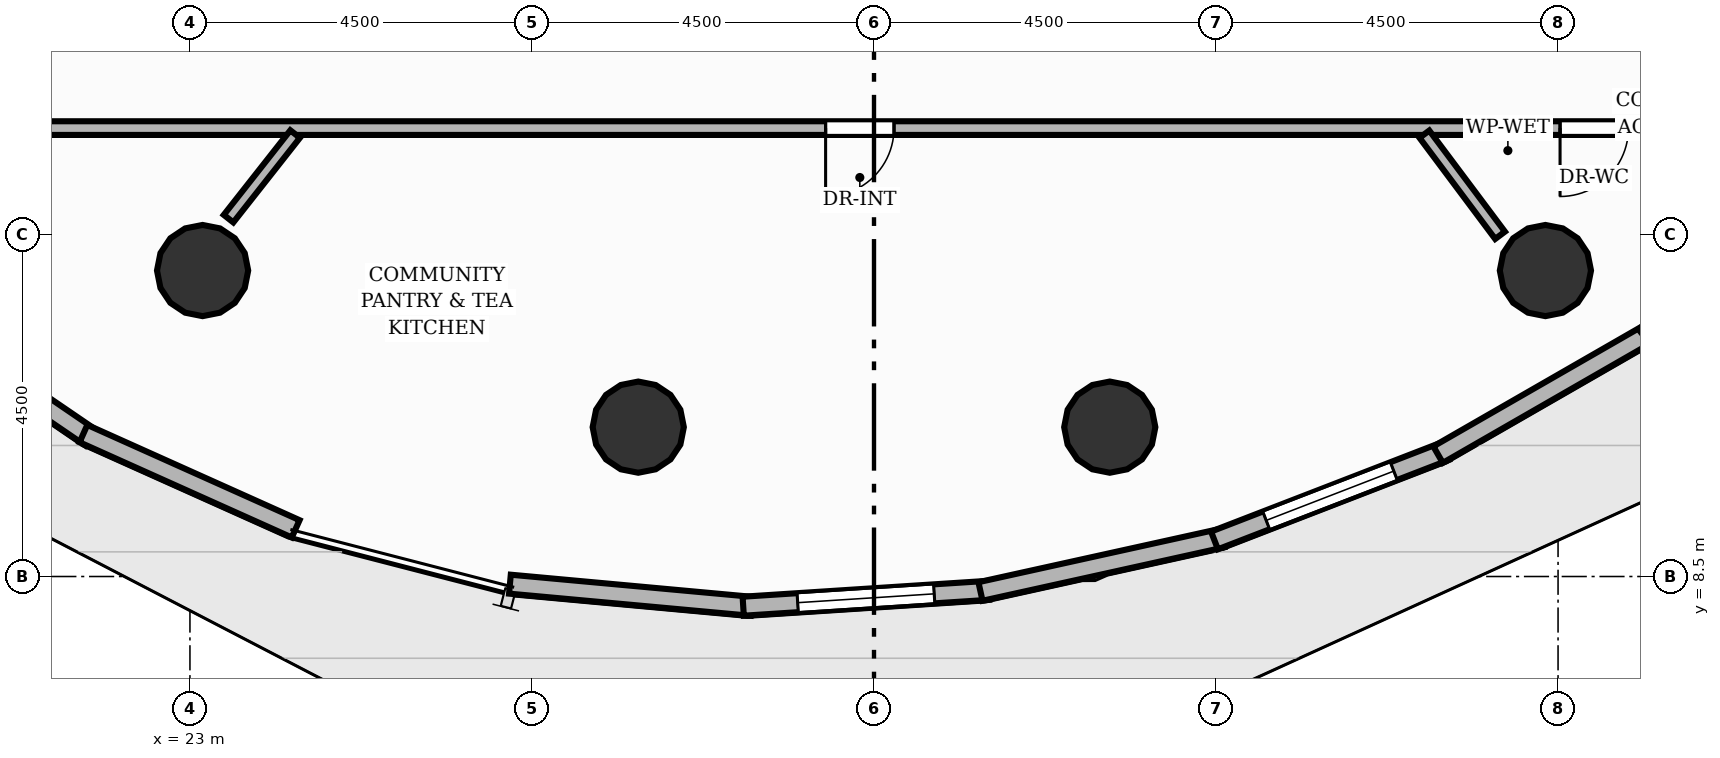
"""IFC4 building model, lengths in metres.
Left out: names, types, materials, properties, quantities, classifications, styles, units other than length and angle.
Written with IfcOpenShell. Run it as: python <this file> out.ifc"""

import sys

from ifc_helpers import new_model, si_unit, direction, frame, frame_2d, origin, origin_2d, place, context, subcontext, project, spatial, rectangle, circle, extrude, element, fill, save


model = new_model("IFC4")
c1 = context("Model", 3, precision=1e-05, world=origin(), true_north=direction((0.0, 1.0)))
c2 = subcontext(c1, "Body", "Model", "MODEL_VIEW")
j1 = project(units=[si_unit("LENGTHUNIT", "METRE"), si_unit("PLANEANGLEUNIT", "RADIAN")], contexts=[c1])
p1 = place(None, origin())
s1 = spatial("IfcSite", under=j1, at=p1, CompositionType="ELEMENT")
p2 = place(p1, origin())
s2 = spatial("IfcBuilding", under=s1, at=p2, CompositionType="ELEMENT")
p3 = place(p2, frame((0.0, 0.0, 70.88)))
s3 = spatial("IfcBuildingStorey", under=s2, at=p3, CompositionType="ELEMENT", Elevation=70.88)
for number, where, z_axis, x_axis in (
    (1, (23.167, 12.526, 0.0), (0.0, 0.0, 1.0), (1.0, 0.0, 0.0)),
    (2, (28.898, 10.465, 0.0), (0.0, 0.0, 1.0), (1.0, 0.0, 0.0)),
    (3, (35.102, 10.465, 0.0), (0.0, 0.0, 1.0), (1.0, 0.0, 0.0)),
    (4, (40.833, 12.526, 0.0), (0.0, 0.0, 1.0), (1.0, 0.0, 0.0)),
):
    element("IfcColumn", number, at=place(p3, frame(where, z_axis=z_axis, x_axis=x_axis)), inside=s3, PredefinedType="COLUMN", context=c2, shape_type="SweptSolid", body=[
        extrude(circle(Radius=0.6, at=origin_2d()), origin(), (0.0, 0.0, 1.0), 3.2),
    ])
p4 = place(p3, frame((21.696, 10.326, 0.0), z_axis=(0.0, 0.0, 1.0), x_axis=(-0.825967987646, 0.56371702421, 0.0)))
e5 = element("IfcWall", 5, at=p4, inside=s3, PredefinedType="SOLIDWALL", context=c2, shape_type="SweptSolid", body=[
    extrude(rectangle(XDim=2.988, YDim=0.25, at=frame_2d((1.494, 0.0))), origin(), (0.0, 0.0, 1.0), 2.96),
])
p5 = place(p4, frame((0.919, 0.0, 0.0)))
e6 = element("IfcOpeningElement", 6, at=p5, cuts=e5, PredefinedType="OPENING", context=c2, shape_type="SweptSolid", body=[
    extrude(rectangle(XDim=1.15, YDim=2.2, at=frame_2d((0.575, 1.1))), frame((0.0, 0.135, 0.0), z_axis=(0.0, -1.0, 0.0), x_axis=(1.0, 0.0, 0.0)), (0.0, 0.0, 1.0), 0.27),
])
p6 = place(p3, frame((24.391, 9.127, 0.0), z_axis=(0.0, 0.0, 1.0), x_axis=(-0.912401485772, 0.40929638254, 0.0)))
e7 = element("IfcWall", 7, at=p6, inside=s3, PredefinedType="SOLIDWALL", context=c2, shape_type="SweptSolid", body=[
    extrude(rectangle(XDim=3.061, YDim=0.25, at=frame_2d((1.53, 0.0))), origin(), (0.0, 0.0, 1.0), 2.96),
])
p7 = place(p3, frame((30.388, 8.108, 0.0), z_axis=(0.0, 0.0, 1.0), x_axis=(-0.9958277433, 0.091252976247, 0.0)))
e8 = element("IfcWall", 8, at=p7, inside=s3, PredefinedType="SOLIDWALL", context=c2, shape_type="SweptSolid", body=[
    extrude(rectangle(XDim=3.192, YDim=0.25, at=frame_2d((1.596, 0.0))), origin(), (0.0, 0.0, 1.0), 2.96),
])
p8 = place(p3, frame((33.509, 8.318, 0.0), z_axis=(0.0, 0.0, 1.0), x_axis=(-0.997907602465, -0.064656143896, 0.0)))
e9 = element("IfcWall", 9, at=p8, inside=s3, PredefinedType="SOLIDWALL", context=c2, shape_type="SweptSolid", body=[
    extrude(rectangle(XDim=3.236, YDim=0.25, at=frame_2d((1.618, 0.0))), origin(), (0.0, 0.0, 1.0), 2.96),
])
p9 = place(p8, frame((0.718, 0.0, 0.85)))
e10 = element("IfcOpeningElement", 10, at=p9, cuts=e9, PredefinedType="OPENING", context=c2, shape_type="SweptSolid", body=[
    extrude(rectangle(XDim=1.8, YDim=2.0, at=frame_2d((0.9, 1.0))), frame((0.0, 0.135, 0.0), z_axis=(0.0, -1.0, 0.0), x_axis=(1.0, 0.0, 0.0)), (0.0, 0.0, 1.0), 0.27),
])
p10 = place(p3, frame((36.584, 9.006, 0.0), z_axis=(0.0, 0.0, 1.0), x_axis=(-0.976457694784, -0.215708994476, 0.0)))
e11 = element("IfcWall", 11, at=p10, inside=s3, PredefinedType="SOLIDWALL", context=c2, shape_type="SweptSolid", body=[
    extrude(rectangle(XDim=3.26, YDim=0.25, at=frame_2d((1.63, 0.0))), origin(), (0.0, 0.0, 1.0), 2.96),
])
p11 = place(p3, frame((39.52, 10.15, 0.0), z_axis=(0.0, 0.0, 1.0), x_axis=(-0.932707116004, -0.360634767812, 0.0)))
e12 = element("IfcWall", 12, at=p11, inside=s3, PredefinedType="SOLIDWALL", context=c2, shape_type="SweptSolid", body=[
    extrude(rectangle(XDim=3.26, YDim=0.25, at=frame_2d((1.63, 0.0))), origin(), (0.0, 0.0, 1.0), 2.96),
])
p12 = place(p11, frame((0.73, 0.0, 0.85)))
e13 = element("IfcOpeningElement", 13, at=p12, cuts=e12, PredefinedType="OPENING", context=c2, shape_type="SweptSolid", body=[
    extrude(rectangle(XDim=1.8, YDim=2.0, at=frame_2d((0.9, 1.0))), frame((0.0, 0.135, 0.0), z_axis=(0.0, -1.0, 0.0), x_axis=(1.0, 0.0, 0.0)), (0.0, 0.0, 1.0), 0.27),
])
p13 = place(p3, frame((42.227, 11.717, 0.0), z_axis=(0.0, 0.0, 1.0), x_axis=(-0.866935640597, -0.498420098975, 0.0)))
e14 = element("IfcWall", 14, at=p13, inside=s3, PredefinedType="SOLIDWALL", context=c2, shape_type="SweptSolid", body=[
    extrude(rectangle(XDim=3.236, YDim=0.25, at=frame_2d((1.618, 0.0))), origin(), (0.0, 0.0, 1.0), 2.96),
])
p14 = place(p3, frame((44.623, 13.656, 0.0), z_axis=(0.0, 0.0, 1.0), x_axis=(-0.778932404301, -0.627107893054, 0.0)))
e15 = element("IfcWall", 15, at=p14, inside=s3, PredefinedType="SOLIDWALL", context=c2, shape_type="SweptSolid", body=[
    extrude(rectangle(XDim=3.192, YDim=0.25, at=frame_2d((1.596, 0.0))), origin(), (0.0, 0.0, 1.0), 2.96),
])
p15 = place(p14, frame((0.696, 0.0, 0.85)))
e16 = element("IfcOpeningElement", 16, at=p15, cuts=e15, PredefinedType="OPENING", context=c2, shape_type="SweptSolid", body=[
    extrude(rectangle(XDim=1.8, YDim=2.0, at=frame_2d((0.9, 1.0))), frame((0.0, 0.135, 0.0), z_axis=(0.0, -1.0, 0.0), x_axis=(1.0, 0.0, 0.0)), (0.0, 0.0, 1.0), 0.27),
])
p16 = place(p3, frame((43.231, 14.4, 0.0), z_axis=(0.0, 0.0, 1.0), x_axis=(-1.0, 0.0, 0.0)))
e17 = element("IfcWall", 17, at=p16, inside=s3, PredefinedType="PARTITIONING", context=c2, shape_type="SweptSolid", body=[
    extrude(rectangle(XDim=22.771, YDim=0.18, at=frame_2d((11.386, 0.0))), origin(), (0.0, 0.0, 1.0), 2.955),
])
p17 = place(p16, frame((10.968, 0.0, 0.0)))
e18 = element("IfcOpeningElement", 18, at=p17, cuts=e17, PredefinedType="OPENING", context=c2, shape_type="SweptSolid", body=[
    extrude(rectangle(XDim=0.9, YDim=2.1, at=frame_2d((0.45, 1.05))), frame((0.0, 0.1, 0.0), z_axis=(0.0, -1.0, 0.0), x_axis=(1.0, 0.0, 0.0)), (0.0, 0.0, 1.0), 0.2),
])
p18 = place(p16, frame((1.305, 0.0, 0.0)))
e19 = element("IfcOpeningElement", 19, at=p18, cuts=e17, PredefinedType="OPENING", context=c2, shape_type="SweptSolid", body=[
    extrude(rectangle(XDim=0.9, YDim=2.1, at=frame_2d((0.45, 1.05))), frame((0.0, 0.1, 0.0), z_axis=(0.0, -1.0, 0.0), x_axis=(1.0, 0.0, 0.0)), (0.0, 0.0, 1.0), 0.2),
])
p19 = place(p3, frame((24.384, 14.321, 0.0), z_axis=(0.0, 0.0, 1.0), x_axis=(-0.61843050819, -0.785839491589, 0.0)))
e20 = element("IfcWall", 20, at=p19, inside=s3, PredefinedType="PLUMBINGWALL", context=c2, shape_type="SweptSolid", body=[
    extrude(rectangle(XDim=1.416, YDim=0.16, at=frame_2d((0.708, 0.0))), origin(), (0.0, 0.0, 1.0), 2.261),
])
p20 = place(p3, frame((39.242, 14.32, 0.0), z_axis=(0.0, 0.0, 1.0), x_axis=(0.599082687588, -0.800687163274, 0.0)))
e21 = element("IfcWall", 21, at=p20, inside=s3, PredefinedType="PLUMBINGWALL", context=c2, shape_type="SweptSolid", body=[
    extrude(rectangle(XDim=1.661, YDim=0.16, at=frame_2d((0.831, 0.0))), origin(), (0.0, 0.0, 1.0), 2.261),
])
p21 = place(p9, origin())
e22 = element("IfcWindow", 22, at=p21, inside=s3, PartitioningType="SINGLE_PANEL", PredefinedType="WINDOW", context=c2, shape_type="SweptSolid", body=[
    extrude(rectangle(XDim=1.8, YDim=2.0, at=frame_2d((0.9, 1.0))), frame((0.0, 0.03, 0.0), z_axis=(0.0, -1.0, 0.0), x_axis=(1.0, 0.0, 0.0)), (0.0, 0.0, 1.0), 0.06),
])
fill(e10, e22)
p22 = place(p12, origin())
e23 = element("IfcWindow", 23, at=p22, inside=s3, PartitioningType="SINGLE_PANEL", PredefinedType="WINDOW", context=c2, shape_type="SweptSolid", body=[
    extrude(rectangle(XDim=1.8, YDim=2.0, at=frame_2d((0.9, 1.0))), frame((0.0, 0.03, 0.0), z_axis=(0.0, -1.0, 0.0), x_axis=(1.0, 0.0, 0.0)), (0.0, 0.0, 1.0), 0.06),
])
fill(e13, e23)
p23 = place(p17, origin())
e24 = element("IfcDoor", 24, at=p23, inside=s3, OperationType="SINGLE_SWING_RIGHT", PredefinedType="DOOR", context=c2, shape_type="SweptSolid", body=[
    extrude(rectangle(XDim=0.9, YDim=2.1, at=frame_2d((0.45, 1.05))), frame((0.0, 0.025, 0.0), z_axis=(0.0, -1.0, 0.0), x_axis=(1.0, 0.0, 0.0)), (0.0, 0.0, 1.0), 0.05),
])
fill(e18, e24)
p24 = place(p18, origin())
e25 = element("IfcDoor", 25, at=p24, inside=s3, OperationType="SINGLE_SWING_RIGHT", PredefinedType="DOOR", context=c2, shape_type="SweptSolid", body=[
    extrude(rectangle(XDim=0.9, YDim=2.1, at=frame_2d((0.45, 1.05))), frame((0.0, 0.025, 0.0), z_axis=(0.0, -1.0, 0.0), x_axis=(1.0, 0.0, 0.0)), (0.0, 0.0, 1.0), 0.05),
])
fill(e19, e25)
save(model, sys.argv[1])
